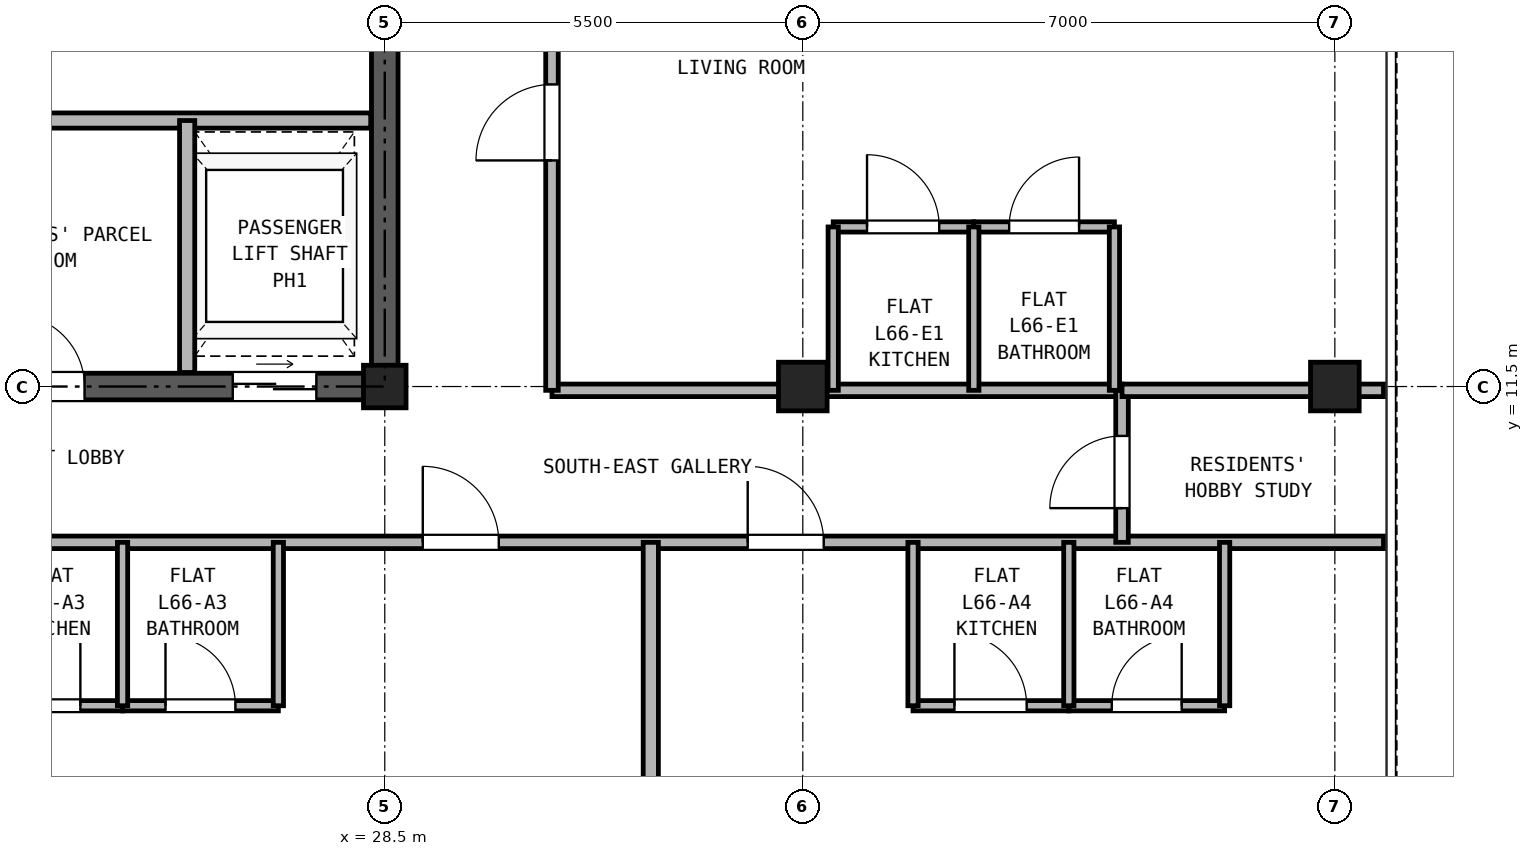
"""IFC4 building model, lengths in metres.
Left out: names, types, materials, properties, quantities, classifications, styles, units other than length and angle.
Written with IfcOpenShell. Run it as: python <this file> out.ifc"""

import sys

from ifc_helpers import new_model, si_unit, direction, frame, frame_2d, origin, origin_2d, place, context, subcontext, project, spatial, rectangle, hollow_rectangle, extrude, source, transform, mapped, element, fill, save


model = new_model("IFC4")
c1 = context("Model", 3, precision=1e-05, world=origin(), true_north=direction((0.0, 1.0)))
c2 = subcontext(c1, "Body", "Model", "MODEL_VIEW")
j1 = project(units=[si_unit("LENGTHUNIT", "METRE"), si_unit("PLANEANGLEUNIT", "RADIAN")], contexts=[c1])
p1 = place(None, origin())
s1 = spatial("IfcSite", under=j1, at=p1, CompositionType="ELEMENT")
p2 = place(p1, origin())
s2 = spatial("IfcBuilding", under=s1, at=p2, CompositionType="ELEMENT")
p3 = place(p2, frame((0.0, 0.0, 232.9)))
s3 = spatial("IfcBuildingStorey", under=s2, at=p3, CompositionType="ELEMENT", Elevation=232.9)
m1 = source(origin(), c2, "Body", "SweptSolid", [
    extrude(hollow_rectangle(XDim=0.64, YDim=0.64, WallThickness=0.035, at=origin_2d()), origin(), (0.0, 0.0, 1.0), 2.98),
])
p4 = place(p3, frame((41.0, 11.5, 0.0), z_axis=(0.0, 0.0, 1.0), x_axis=(1.0, 0.0, 0.0)))
e1 = element("IfcColumn", 1, at=p4, inside=s3, PredefinedType="COLUMN", context=c2, shape_type="MappedRepresentation", body=[
    mapped(m1, transform((0.0, 0.0, 0.0), x_axis=(1.0, 0.0, 0.0), y_axis=(0.0, 1.0, 0.0), z_axis=(0.0, 0.0, 1.0), scale=1.0)),
])
m2 = source(origin(), c2, "Body", "SweptSolid", [
    extrude(hollow_rectangle(XDim=0.56, YDim=0.56, WallThickness=0.03, at=origin_2d()), origin(), (0.0, 0.0, 1.0), 2.98),
])
p5 = place(p3, frame((28.5, 11.5, 0.0), z_axis=(0.0, 0.0, 1.0), x_axis=(1.0, 0.0, 0.0)))
e2 = element("IfcColumn", 2, at=p5, inside=s3, PredefinedType="COLUMN", context=c2, shape_type="MappedRepresentation", body=[
    mapped(m2, transform((0.0, 0.0, 0.0), x_axis=(1.0, 0.0, 0.0), y_axis=(0.0, 1.0, 0.0), z_axis=(0.0, 0.0, 1.0), scale=1.0)),
])
p6 = place(p3, frame((34.0, 11.5, 0.0), z_axis=(0.0, 0.0, 1.0), x_axis=(1.0, 0.0, 0.0)))
e3 = element("IfcColumn", 3, at=p6, inside=s3, PredefinedType="COLUMN", context=c2, shape_type="MappedRepresentation", body=[
    mapped(m1, transform((0.0, 0.0, 0.0), x_axis=(1.0, 0.0, 0.0), y_axis=(0.0, 1.0, 0.0), z_axis=(0.0, 0.0, 1.0), scale=1.0)),
])
p7 = place(p3, frame((18.325, 11.5, 0.0), z_axis=(0.0, 0.0, 1.0), x_axis=(1.0, 0.0, 0.0)))
e4 = element("IfcWall", 4, at=p7, inside=s3, PredefinedType="SHEAR", context=c2, shape_type="SweptSolid", body=[
    extrude(rectangle(XDim=10.35, YDim=0.35, at=frame_2d((5.175, 0.0))), origin(), (0.0, 0.0, 1.0), 2.98),
])
p8 = place(p7, frame((1.775, 0.0, 0.0)))
e5 = element("IfcOpeningElement", 5, at=p8, cuts=e4, PredefinedType="OPENING", context=c2, shape_type="SweptSolid", body=[
    extrude(rectangle(XDim=0.95, YDim=2.15, at=frame_2d((0.475, 1.075))), frame((0.0, 0.185, 0.0), z_axis=(0.0, -1.0, 0.0), x_axis=(1.0, 0.0, 0.0)), (0.0, 0.0, 1.0), 0.37),
])
p9 = place(p7, frame((5.275, 0.0, 0.0)))
e6 = element("IfcOpeningElement", 6, at=p9, cuts=e4, PredefinedType="OPENING", context=c2, shape_type="SweptSolid", body=[
    extrude(rectangle(XDim=0.95, YDim=2.15, at=frame_2d((0.475, 1.075))), frame((0.0, 0.185, 0.0), z_axis=(0.0, -1.0, 0.0), x_axis=(1.0, 0.0, 0.0)), (0.0, 0.0, 1.0), 0.37),
])
p10 = place(p7, frame((8.175, 0.0, 0.0)))
e7 = element("IfcOpeningElement", 7, at=p10, cuts=e4, PredefinedType="OPENING", context=c2, shape_type="SweptSolid", body=[
    extrude(rectangle(XDim=1.1, YDim=2.25, at=frame_2d((0.55, 1.125))), frame((0.0, 0.185, 0.0), z_axis=(0.0, -1.0, 0.0), x_axis=(1.0, 0.0, 0.0)), (0.0, 0.0, 1.0), 0.37),
])
p11 = place(p3, frame((28.5, 11.675, 0.0), z_axis=(0.0, 0.0, 1.0), x_axis=(0.0, 1.0, 0.0)))
e8 = element("IfcWall", 8, at=p11, inside=s3, PredefinedType="SHEAR", context=c2, shape_type="SweptSolid", body=[
    extrude(rectangle(XDim=16.9, YDim=0.35, at=frame_2d((8.45, 0.0))), origin(), (0.0, 0.0, 1.0), 2.98),
])
p12 = place(p11, frame((7.475, 0.0, 0.0)))
e9 = element("IfcOpeningElement", 9, at=p12, cuts=e8, PredefinedType="OPENING", context=c2, shape_type="SweptSolid", body=[
    extrude(rectangle(XDim=1.15, YDim=2.2, at=frame_2d((0.575, 1.1))), frame((0.0, 0.185, 0.0), z_axis=(0.0, -1.0, 0.0), x_axis=(1.0, 0.0, 0.0)), (0.0, 0.0, 1.0), 0.37),
])
p13 = place(p3, frame((18.685, 15.0, 0.0), z_axis=(0.0, 0.0, 1.0), x_axis=(1.0, 0.0, 0.0)))
e10 = element("IfcWall", 10, at=p13, inside=s3, PredefinedType="PARTITIONING", context=c2, shape_type="SweptSolid", body=[
    extrude(rectangle(XDim=9.63, YDim=0.2, at=frame_2d((4.815, 0.0))), origin(), (0.0, 0.0, 1.0), 2.98),
])
p14 = place(p3, frame((25.9, 11.685, 0.0), z_axis=(0.0, 0.0, 1.0), x_axis=(0.0, 1.0, 0.0)))
e11 = element("IfcWall", 11, at=p14, inside=s3, PredefinedType="PARTITIONING", context=c2, shape_type="SweptSolid", body=[
    extrude(rectangle(XDim=3.315, YDim=0.2, at=frame_2d((1.657, 0.0))), origin(), (0.0, 0.0, 1.0), 2.98),
])
p15 = place(p3, frame((5.36, 9.45, 0.0), z_axis=(0.0, 0.0, 1.0), x_axis=(1.0, 0.0, 0.0)))
e12 = element("IfcWall", 12, at=p15, inside=s3, PredefinedType="PARTITIONING", context=c2, shape_type="SweptSolid", body=[
    extrude(rectangle(XDim=36.28, YDim=0.165, at=frame_2d((18.14, 0.0))), origin(), (0.0, 0.0, 1.0), 2.98),
])
p16 = place(p15, frame((7.115, 0.0, 0.0)))
e13 = element("IfcOpeningElement", 13, at=p16, cuts=e12, PredefinedType="OPENING", context=c2, shape_type="SweptSolid", body=[
    extrude(rectangle(XDim=1.0, YDim=2.15, at=frame_2d((0.5, 1.075))), frame((0.0, 0.093, 0.0), z_axis=(0.0, -1.0, 0.0), x_axis=(1.0, 0.0, 0.0)), (0.0, 0.0, 1.0), 0.185),
])
p17 = place(p15, frame((10.89, 0.0, 0.0)))
e14 = element("IfcOpeningElement", 14, at=p17, cuts=e12, PredefinedType="OPENING", context=c2, shape_type="SweptSolid", body=[
    extrude(rectangle(XDim=1.0, YDim=2.15, at=frame_2d((0.5, 1.075))), frame((0.0, 0.093, 0.0), z_axis=(0.0, -1.0, 0.0), x_axis=(1.0, 0.0, 0.0)), (0.0, 0.0, 1.0), 0.185),
])
p18 = place(p15, frame((23.64, 0.0, 0.0)))
e15 = element("IfcOpeningElement", 15, at=p18, cuts=e12, PredefinedType="OPENING", context=c2, shape_type="SweptSolid", body=[
    extrude(rectangle(XDim=1.0, YDim=2.15, at=frame_2d((0.5, 1.075))), frame((0.0, 0.093, 0.0), z_axis=(0.0, -1.0, 0.0), x_axis=(1.0, 0.0, 0.0)), (0.0, 0.0, 1.0), 0.185),
])
p19 = place(p15, frame((27.915, 0.0, 0.0)))
e16 = element("IfcOpeningElement", 16, at=p19, cuts=e12, PredefinedType="OPENING", context=c2, shape_type="SweptSolid", body=[
    extrude(rectangle(XDim=1.0, YDim=2.15, at=frame_2d((0.5, 1.075))), frame((0.0, 0.093, 0.0), z_axis=(0.0, -1.0, 0.0), x_axis=(1.0, 0.0, 0.0)), (0.0, 0.0, 1.0), 0.185),
])
p20 = place(p3, frame((30.7, 11.45, 0.0), z_axis=(0.0, 0.0, 1.0), x_axis=(1.0, 0.0, 0.0)))
e17 = element("IfcWall", 17, at=p20, inside=s3, PredefinedType="PARTITIONING", context=c2, shape_type="SweptSolid", body=[
    extrude(rectangle(XDim=7.5, YDim=0.165, at=frame_2d((3.75, 0.0))), origin(), (0.0, 0.0, 1.0), 2.428),
])
p21 = place(p3, frame((38.2, 9.45, 0.0), z_axis=(0.0, 0.0, 1.0), x_axis=(0.0, 1.0, 0.0)))
e18 = element("IfcWall", 18, at=p21, inside=s3, PredefinedType="PARTITIONING", context=c2, shape_type="SweptSolid", body=[
    extrude(rectangle(XDim=2.0, YDim=0.165, at=frame_2d((1.0, 0.0))), origin(), (0.0, 0.0, 1.0), 2.98),
])
p22 = place(p21, frame((0.45, 0.0, 0.0)))
e19 = element("IfcOpeningElement", 19, at=p22, cuts=e18, PredefinedType="OPENING", context=c2, shape_type="SweptSolid", body=[
    extrude(rectangle(XDim=0.95, YDim=2.15, at=frame_2d((0.475, 1.075))), frame((0.0, 0.093, 0.0), z_axis=(0.0, -1.0, 0.0), x_axis=(1.0, 0.0, 0.0)), (0.0, 0.0, 1.0), 0.185),
])
p23 = place(p3, frame((30.7, 11.45, 0.0), z_axis=(0.0, 0.0, 1.0), x_axis=(0.0, 1.0, 0.0)))
e20 = element("IfcWall", 20, at=p23, inside=s3, PredefinedType="PARTITIONING", context=c2, shape_type="SweptSolid", body=[
    extrude(rectangle(XDim=23.69, YDim=0.165, at=frame_2d((11.845, 0.0))), origin(), (0.0, 0.0, 1.0), 2.98),
])
p24 = place(p23, frame((3.025, 0.0, 0.0)))
e21 = element("IfcOpeningElement", 21, at=p24, cuts=e20, PredefinedType="OPENING", context=c2, shape_type="SweptSolid", body=[
    extrude(rectangle(XDim=1.0, YDim=2.15, at=frame_2d((0.5, 1.075))), frame((0.0, 0.093, 0.0), z_axis=(0.0, -1.0, 0.0), x_axis=(1.0, 0.0, 0.0)), (0.0, 0.0, 1.0), 0.185),
])
p25 = place(p23, frame((10.8, 0.0, 0.0)))
e22 = element("IfcOpeningElement", 22, at=p25, cuts=e20, PredefinedType="OPENING", context=c2, shape_type="SweptSolid", body=[
    extrude(rectangle(XDim=1.0, YDim=2.15, at=frame_2d((0.5, 1.075))), frame((0.0, 0.093, 0.0), z_axis=(0.0, -1.0, 0.0), x_axis=(1.0, 0.0, 0.0)), (0.0, 0.0, 1.0), 0.185),
])
p26 = place(p23, frame((16.825, 0.0, 0.0)))
e23 = element("IfcOpeningElement", 23, at=p26, cuts=e20, PredefinedType="OPENING", context=c2, shape_type="SweptSolid", body=[
    extrude(rectangle(XDim=1.0, YDim=2.15, at=frame_2d((0.5, 1.075))), frame((0.0, 0.093, 0.0), z_axis=(0.0, -1.0, 0.0), x_axis=(1.0, 0.0, 0.0)), (0.0, 0.0, 1.0), 0.185),
])
p27 = place(p3, frame((23.0, 7.3, 0.0), z_axis=(0.0, 0.0, 1.0), x_axis=(1.0, 0.0, 0.0)))
e24 = element("IfcWall", 24, at=p27, inside=s3, PredefinedType="PARTITIONING", context=c2, shape_type="SweptSolid", body=[
    extrude(rectangle(XDim=2.05, YDim=0.135, at=frame_2d((1.025, 0.0))), origin(), (0.0, 0.0, 1.0), 2.98),
])
p28 = place(p27, frame((0.545, 0.0, 0.0)))
e25 = element("IfcOpeningElement", 25, at=p28, cuts=e24, PredefinedType="OPENING", context=c2, shape_type="SweptSolid", body=[
    extrude(rectangle(XDim=0.95, YDim=2.15, at=frame_2d((0.475, 1.075))), frame((0.0, 0.077, 0.0), z_axis=(0.0, -1.0, 0.0), x_axis=(1.0, 0.0, 0.0)), (0.0, 0.0, 1.0), 0.155),
])
p29 = place(p3, frame((25.05, 7.3, 0.0), z_axis=(0.0, 0.0, 1.0), x_axis=(1.0, 0.0, 0.0)))
e26 = element("IfcWall", 26, at=p29, inside=s3, PredefinedType="PARTITIONING", context=c2, shape_type="SweptSolid", body=[
    extrude(rectangle(XDim=2.05, YDim=0.135, at=frame_2d((1.025, 0.0))), origin(), (0.0, 0.0, 1.0), 2.98),
])
p30 = place(p29, frame((0.565, 0.0, 0.0)))
e27 = element("IfcOpeningElement", 27, at=p30, cuts=e26, PredefinedType="OPENING", context=c2, shape_type="SweptSolid", body=[
    extrude(rectangle(XDim=0.92, YDim=2.1, at=frame_2d((0.46, 1.05))), frame((0.0, 0.077, 0.0), z_axis=(0.0, -1.0, 0.0), x_axis=(1.0, 0.0, 0.0)), (0.0, 0.0, 1.0), 0.155),
])
for number, where, z_axis, x_axis in (
    (28, (25.05, 7.3, 0.0), (0.0, 0.0, 1.0), (0.0, 1.0, 0.0)),
    (29, (27.1, 7.3, 0.0), (0.0, 0.0, 1.0), (0.0, 1.0, 0.0)),
):
    element("IfcWall", number, at=place(p3, frame(where, z_axis=z_axis, x_axis=x_axis)), inside=s3, PredefinedType="PARTITIONING", context=c2, shape_type="SweptSolid", body=[
        extrude(rectangle(XDim=2.15, YDim=0.135, at=frame_2d((1.075, 0.0))), origin(), (0.0, 0.0, 1.0), 2.98),
    ])
p31 = place(p3, frame((32.0, 0.16, 0.0), z_axis=(0.0, 0.0, 1.0), x_axis=(0.0, 1.0, 0.0)))
e30 = element("IfcWall", 30, at=p31, inside=s3, PredefinedType="PARTITIONING", context=c2, shape_type="SweptSolid", body=[
    extrude(rectangle(XDim=9.29, YDim=0.2, at=frame_2d((4.645, 0.0))), origin(), (0.0, 0.0, 1.0), 2.98),
])
p32 = place(p3, frame((35.45, 7.3, 0.0), z_axis=(0.0, 0.0, 1.0), x_axis=(1.0, 0.0, 0.0)))
e31 = element("IfcWall", 31, at=p32, inside=s3, PredefinedType="PARTITIONING", context=c2, shape_type="SweptSolid", body=[
    extrude(rectangle(XDim=2.05, YDim=0.135, at=frame_2d((1.025, 0.0))), origin(), (0.0, 0.0, 1.0), 2.98),
])
p33 = place(p32, frame((0.545, 0.0, 0.0)))
e32 = element("IfcOpeningElement", 32, at=p33, cuts=e31, PredefinedType="OPENING", context=c2, shape_type="SweptSolid", body=[
    extrude(rectangle(XDim=0.95, YDim=2.15, at=frame_2d((0.475, 1.075))), frame((0.0, 0.077, 0.0), z_axis=(0.0, -1.0, 0.0), x_axis=(1.0, 0.0, 0.0)), (0.0, 0.0, 1.0), 0.155),
])
p34 = place(p3, frame((37.5, 7.3, 0.0), z_axis=(0.0, 0.0, 1.0), x_axis=(1.0, 0.0, 0.0)))
e33 = element("IfcWall", 33, at=p34, inside=s3, PredefinedType="PARTITIONING", context=c2, shape_type="SweptSolid", body=[
    extrude(rectangle(XDim=2.05, YDim=0.135, at=frame_2d((1.025, 0.0))), origin(), (0.0, 0.0, 1.0), 2.98),
])
p35 = place(p34, frame((0.565, 0.0, 0.0)))
e34 = element("IfcOpeningElement", 34, at=p35, cuts=e33, PredefinedType="OPENING", context=c2, shape_type="SweptSolid", body=[
    extrude(rectangle(XDim=0.92, YDim=2.1, at=frame_2d((0.46, 1.05))), frame((0.0, 0.077, 0.0), z_axis=(0.0, -1.0, 0.0), x_axis=(1.0, 0.0, 0.0)), (0.0, 0.0, 1.0), 0.155),
])
for number, where, z_axis, x_axis in (
    (35, (35.45, 7.3, 0.0), (0.0, 0.0, 1.0), (0.0, 1.0, 0.0)),
    (36, (37.5, 7.3, 0.0), (0.0, 0.0, 1.0), (0.0, 1.0, 0.0)),
    (37, (39.55, 7.3, 0.0), (0.0, 0.0, 1.0), (0.0, 1.0, 0.0)),
):
    element("IfcWall", number, at=place(p3, frame(where, z_axis=z_axis, x_axis=x_axis)), inside=s3, PredefinedType="PARTITIONING", context=c2, shape_type="SweptSolid", body=[
        extrude(rectangle(XDim=2.15, YDim=0.135, at=frame_2d((1.075, 0.0))), origin(), (0.0, 0.0, 1.0), 2.98),
    ])
p36 = place(p3, frame((38.2, 11.45, 0.0), z_axis=(0.0, 0.0, 1.0), x_axis=(1.0, 0.0, 0.0)))
e38 = element("IfcWall", 38, at=p36, inside=s3, PredefinedType="PARTITIONING", context=c2, shape_type="SweptSolid", body=[
    extrude(rectangle(XDim=3.44, YDim=0.165, at=frame_2d((1.72, 0.0))), origin(), (0.0, 0.0, 1.0), 2.428),
])
p37 = place(p3, frame((34.4, 13.6, 0.0), z_axis=(0.0, 0.0, 1.0), x_axis=(1.0, 0.0, 0.0)))
e39 = element("IfcWall", 39, at=p37, inside=s3, PredefinedType="PARTITIONING", context=c2, shape_type="SweptSolid", body=[
    extrude(rectangle(XDim=1.85, YDim=0.135, at=frame_2d((0.925, 0.0))), origin(), (0.0, 0.0, 1.0), 2.98),
])
p38 = place(p37, frame((0.445, 0.0, 0.0)))
e40 = element("IfcOpeningElement", 40, at=p38, cuts=e39, PredefinedType="OPENING", context=c2, shape_type="SweptSolid", body=[
    extrude(rectangle(XDim=0.95, YDim=2.15, at=frame_2d((0.475, 1.075))), frame((0.0, 0.077, 0.0), z_axis=(0.0, -1.0, 0.0), x_axis=(1.0, 0.0, 0.0)), (0.0, 0.0, 1.0), 0.155),
])
p39 = place(p3, frame((36.25, 13.6, 0.0), z_axis=(0.0, 0.0, 1.0), x_axis=(1.0, 0.0, 0.0)))
e41 = element("IfcWall", 41, at=p39, inside=s3, PredefinedType="PARTITIONING", context=c2, shape_type="SweptSolid", body=[
    extrude(rectangle(XDim=1.85, YDim=0.135, at=frame_2d((0.925, 0.0))), origin(), (0.0, 0.0, 1.0), 2.98),
])
p40 = place(p39, frame((0.465, 0.0, 0.0)))
e42 = element("IfcOpeningElement", 42, at=p40, cuts=e41, PredefinedType="OPENING", context=c2, shape_type="SweptSolid", body=[
    extrude(rectangle(XDim=0.92, YDim=2.1, at=frame_2d((0.46, 1.05))), frame((0.0, 0.077, 0.0), z_axis=(0.0, -1.0, 0.0), x_axis=(1.0, 0.0, 0.0)), (0.0, 0.0, 1.0), 0.155),
])
for number, where, z_axis, x_axis in (
    (43, (34.4, 11.45, 0.0), (0.0, 0.0, 1.0), (0.0, 1.0, 0.0)),
    (44, (36.25, 11.45, 0.0), (0.0, 0.0, 1.0), (0.0, 1.0, 0.0)),
    (45, (38.1, 11.45, 0.0), (0.0, 0.0, 1.0), (0.0, 1.0, 0.0)),
):
    element("IfcWall", number, at=place(p3, frame(where, z_axis=z_axis, x_axis=x_axis)), inside=s3, PredefinedType="PARTITIONING", context=c2, shape_type="SweptSolid", body=[
        extrude(rectangle(XDim=2.15, YDim=0.135, at=frame_2d((1.075, 0.0))), origin(), (0.0, 0.0, 1.0), 2.98),
    ])
p41 = place(p9, frame((0.95, 0.0, 0.0), z_axis=(0.0, 0.0, 1.0), x_axis=(-1.0, 0.0, 0.0)))
e46 = element("IfcDoor", 46, at=p41, inside=s3, OperationType="SINGLE_SWING_LEFT", PredefinedType="DOOR", context=c2, shape_type="SweptSolid", body=[
    extrude(rectangle(XDim=0.95, YDim=2.15, at=frame_2d((0.475, 1.075))), frame((0.0, 0.025, 0.0), z_axis=(0.0, -1.0, 0.0), x_axis=(1.0, 0.0, 0.0)), (0.0, 0.0, 1.0), 0.05),
])
fill(e6, e46)
p42 = place(p10, frame((1.1, 0.0, 0.0), z_axis=(0.0, 0.0, 1.0), x_axis=(-1.0, 0.0, 0.0)))
e47 = element("IfcDoor", 47, at=p42, inside=s3, OperationType="DOUBLE_DOOR_SLIDING", PredefinedType="DOOR", context=c2, shape_type="SweptSolid", body=[
    extrude(rectangle(XDim=1.1, YDim=2.25, at=frame_2d((0.55, 1.125))), frame((0.0, 0.025, 0.0), z_axis=(0.0, -1.0, 0.0), x_axis=(1.0, 0.0, 0.0)), (0.0, 0.0, 1.0), 0.05),
])
fill(e7, e47)
p43 = place(p28, origin())
e48 = element("IfcDoor", 48, at=p43, inside=s3, OperationType="SINGLE_SWING_RIGHT", PredefinedType="DOOR", context=c2, shape_type="SweptSolid", body=[
    extrude(rectangle(XDim=0.95, YDim=2.15, at=frame_2d((0.475, 1.075))), frame((0.0, 0.025, 0.0), z_axis=(0.0, -1.0, 0.0), x_axis=(1.0, 0.0, 0.0)), (0.0, 0.0, 1.0), 0.05),
])
fill(e25, e48)
p44 = place(p30, origin())
e49 = element("IfcDoor", 49, at=p44, inside=s3, OperationType="SINGLE_SWING_LEFT", PredefinedType="DOOR", context=c2, shape_type="SweptSolid", body=[
    extrude(rectangle(XDim=0.92, YDim=2.1, at=frame_2d((0.46, 1.05))), frame((0.0, 0.025, 0.0), z_axis=(0.0, -1.0, 0.0), x_axis=(1.0, 0.0, 0.0)), (0.0, 0.0, 1.0), 0.05),
])
fill(e27, e49)
p45 = place(p18, frame((1.0, 0.0, 0.0), z_axis=(0.0, 0.0, 1.0), x_axis=(-1.0, 0.0, 0.0)))
e50 = element("IfcDoor", 50, at=p45, inside=s3, OperationType="SINGLE_SWING_LEFT", PredefinedType="DOOR", context=c2, shape_type="SweptSolid", body=[
    extrude(rectangle(XDim=1.0, YDim=2.15, at=frame_2d((0.5, 1.075))), frame((0.0, 0.025, 0.0), z_axis=(0.0, -1.0, 0.0), x_axis=(1.0, 0.0, 0.0)), (0.0, 0.0, 1.0), 0.05),
])
fill(e15, e50)
p46 = place(p33, origin())
e51 = element("IfcDoor", 51, at=p46, inside=s3, OperationType="SINGLE_SWING_LEFT", PredefinedType="DOOR", context=c2, shape_type="SweptSolid", body=[
    extrude(rectangle(XDim=0.95, YDim=2.15, at=frame_2d((0.475, 1.075))), frame((0.0, 0.025, 0.0), z_axis=(0.0, -1.0, 0.0), x_axis=(1.0, 0.0, 0.0)), (0.0, 0.0, 1.0), 0.05),
])
fill(e32, e51)
p47 = place(p35, origin())
e52 = element("IfcDoor", 52, at=p47, inside=s3, OperationType="SINGLE_SWING_RIGHT", PredefinedType="DOOR", context=c2, shape_type="SweptSolid", body=[
    extrude(rectangle(XDim=0.92, YDim=2.1, at=frame_2d((0.46, 1.05))), frame((0.0, 0.025, 0.0), z_axis=(0.0, -1.0, 0.0), x_axis=(1.0, 0.0, 0.0)), (0.0, 0.0, 1.0), 0.05),
])
fill(e34, e52)
p48 = place(p19, frame((1.0, 0.0, 0.0), z_axis=(0.0, 0.0, 1.0), x_axis=(-1.0, 0.0, 0.0)))
e53 = element("IfcDoor", 53, at=p48, inside=s3, OperationType="SINGLE_SWING_LEFT", PredefinedType="DOOR", context=c2, shape_type="SweptSolid", body=[
    extrude(rectangle(XDim=1.0, YDim=2.15, at=frame_2d((0.5, 1.075))), frame((0.0, 0.025, 0.0), z_axis=(0.0, -1.0, 0.0), x_axis=(1.0, 0.0, 0.0)), (0.0, 0.0, 1.0), 0.05),
])
fill(e16, e53)
p49 = place(p22, origin())
e54 = element("IfcDoor", 54, at=p49, inside=s3, OperationType="SINGLE_SWING_LEFT", PredefinedType="DOOR", context=c2, shape_type="SweptSolid", body=[
    extrude(rectangle(XDim=0.95, YDim=2.15, at=frame_2d((0.475, 1.075))), frame((0.0, 0.025, 0.0), z_axis=(0.0, -1.0, 0.0), x_axis=(1.0, 0.0, 0.0)), (0.0, 0.0, 1.0), 0.05),
])
fill(e19, e54)
p50 = place(p38, origin())
e55 = element("IfcDoor", 55, at=p50, inside=s3, OperationType="SINGLE_SWING_LEFT", PredefinedType="DOOR", context=c2, shape_type="SweptSolid", body=[
    extrude(rectangle(XDim=0.95, YDim=2.15, at=frame_2d((0.475, 1.075))), frame((0.0, 0.025, 0.0), z_axis=(0.0, -1.0, 0.0), x_axis=(1.0, 0.0, 0.0)), (0.0, 0.0, 1.0), 0.05),
])
fill(e40, e55)
p51 = place(p40, origin())
e56 = element("IfcDoor", 56, at=p51, inside=s3, OperationType="SINGLE_SWING_RIGHT", PredefinedType="DOOR", context=c2, shape_type="SweptSolid", body=[
    extrude(rectangle(XDim=0.92, YDim=2.1, at=frame_2d((0.46, 1.05))), frame((0.0, 0.025, 0.0), z_axis=(0.0, -1.0, 0.0), x_axis=(1.0, 0.0, 0.0)), (0.0, 0.0, 1.0), 0.05),
])
fill(e42, e56)
p52 = place(p24, frame((1.0, 0.0, 0.0), z_axis=(0.0, 0.0, 1.0), x_axis=(-1.0, 0.0, 0.0)))
e57 = element("IfcDoor", 57, at=p52, inside=s3, OperationType="SINGLE_SWING_LEFT", PredefinedType="DOOR", context=c2, shape_type="SweptSolid", body=[
    extrude(rectangle(XDim=1.0, YDim=2.15, at=frame_2d((0.5, 1.075))), frame((0.0, 0.025, 0.0), z_axis=(0.0, -1.0, 0.0), x_axis=(1.0, 0.0, 0.0)), (0.0, 0.0, 1.0), 0.05),
])
fill(e21, e57)
save(model, sys.argv[1])
